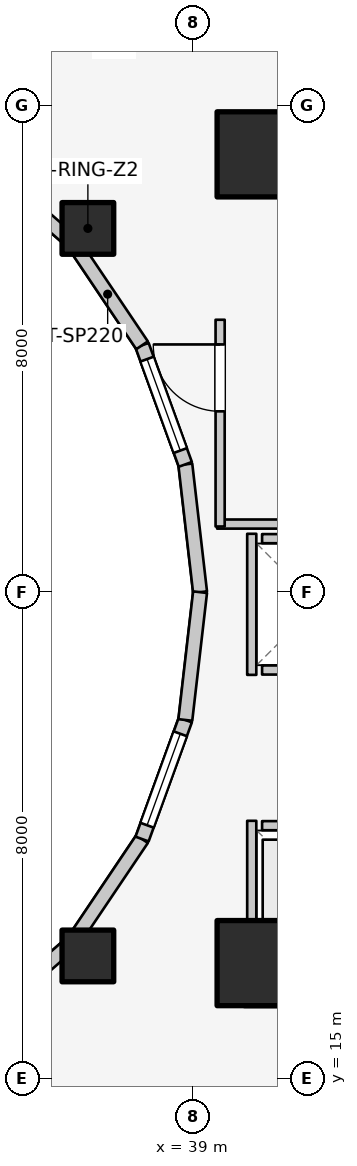
"""IFC4 building model, lengths in metres.
Left out: names, types, materials, properties, quantities, classifications, styles, units other than length and angle.
Written with IfcOpenShell. Run it as: python <this file> out.ifc"""

import sys

from ifc_helpers import new_model, si_unit, direction, frame, frame_2d, origin, origin_2d, place, context, subcontext, project, spatial, rectangle, extrude, element, fill, save


model = new_model("IFC4")
c1 = context("Model", 3, precision=1e-05, world=origin(), true_north=direction((0.0, 1.0)))
c2 = subcontext(c1, "Body", "Model", "MODEL_VIEW")
j1 = project(units=[si_unit("LENGTHUNIT", "METRE"), si_unit("PLANEANGLEUNIT", "RADIAN")], contexts=[c1])
p1 = place(None, origin())
s1 = spatial("IfcSite", under=j1, at=p1, CompositionType="ELEMENT")
p2 = place(p1, origin())
s2 = spatial("IfcBuilding", under=s1, at=p2, CompositionType="ELEMENT")
p3 = place(p2, frame((0.0, 0.0, 94.9)))
s3 = spatial("IfcBuildingStorey", under=s2, at=p3, CompositionType="ELEMENT", Elevation=94.9)
for number, where, z_axis, x_axis in (
    (1, (39.85, 16.55, 0.0), (0.0, 0.0, 1.0), (1.0, 0.0, 0.0)),
    (2, (39.85, 30.35, 0.0), (0.0, 0.0, 1.0), (1.0, 0.0, 0.0)),
):
    element("IfcWall", number, at=place(p3, frame(where, z_axis=z_axis, x_axis=x_axis)), inside=s3, PredefinedType="SHEAR", context=c2, shape_type="SweptSolid", body=[
        extrude(rectangle(XDim=4.5, YDim=0.7, at=frame_2d((2.25, 0.0))), origin(), (0.0, 0.0, 1.0), 3.1),
    ])
for number, where, z_axis, x_axis in (
    (3, (40.1, 16.9, 0.0), (0.0, 0.0, 1.0), (1.0, 0.0, 0.0)),
    (4, (40.1, 30.2, 0.0), (0.0, 0.0, 1.0), (1.0, 0.0, 0.0)),
):
    element("IfcColumn", number, at=place(p3, frame(where, z_axis=z_axis, x_axis=x_axis)), inside=s3, PredefinedType="COLUMN", context=c2, shape_type="SweptSolid", body=[
        extrude(rectangle(XDim=1.4, YDim=1.4, at=origin_2d()), origin(), (0.0, 0.0, 1.0), 3.1),
    ])
for number, where, z_axis, x_axis in (
    (5, (37.275, 28.982, 0.0), (0.0, 0.0, 1.0), (1.0, 0.0, 0.0)),
    (6, (37.275, 17.018, 0.0), (0.0, 0.0, 1.0), (1.0, 0.0, 0.0)),
):
    element("IfcColumn", number, at=place(p3, frame(where, z_axis=z_axis, x_axis=x_axis)), inside=s3, PredefinedType="COLUMN", context=c2, shape_type="SweptSolid", body=[
        extrude(rectangle(XDim=0.85, YDim=0.85, at=origin_2d()), origin(), (0.0, 0.0, 1.0), 3.1),
    ])
p4 = place(p3, frame((39.12, 23.0, 0.0), z_axis=(0.0, 0.0, 1.0), x_axis=(-0.114711713601, 0.993398823617, 0.0)))
e7 = element("IfcWall", 7, at=p4, inside=s3, PredefinedType="STANDARD", context=c2, shape_type="SweptSolid", body=[
    extrude(rectangle(XDim=2.115, YDim=0.23, at=frame_2d((1.058, 0.0))), origin(), (0.0, 0.0, 1.0), 2.84),
])
p5 = place(p3, frame((38.877, 25.102, 0.0), z_axis=(0.0, 0.0, 1.0), x_axis=(-0.341423187295, 0.93990968033, 0.0)))
e8 = element("IfcWall", 8, at=p5, inside=s3, PredefinedType="STANDARD", context=c2, shape_type="SweptSolid", body=[
    extrude(rectangle(XDim=2.084, YDim=0.23, at=frame_2d((1.042, 0.0))), origin(), (0.0, 0.0, 1.0), 2.84),
])
p6 = place(p5, frame((0.242, 0.0, 0.85)))
e9 = element("IfcOpeningElement", 9, at=p6, cuts=e8, PredefinedType="OPENING", context=c2, shape_type="SweptSolid", body=[
    extrude(rectangle(XDim=1.6, YDim=1.65, at=frame_2d((0.8, 0.825))), frame((0.0, 0.125, 0.0), z_axis=(0.0, -1.0, 0.0), x_axis=(1.0, 0.0, 0.0)), (0.0, 0.0, 1.0), 0.25),
])
p7 = place(p3, frame((38.166, 27.06, 0.0), z_axis=(0.0, 0.0, 1.0), x_axis=(-0.558197800898, 0.829707909492, 0.0)))
e10 = element("IfcWall", 10, at=p7, inside=s3, PredefinedType="STANDARD", context=c2, shape_type="SweptSolid", body=[
    extrude(rectangle(XDim=2.027, YDim=0.23, at=frame_2d((1.013, 0.0))), origin(), (0.0, 0.0, 1.0), 2.16),
])
for number, where, z_axis, x_axis in (
    (11, (37.035, 28.742, 0.0), (0.0, 0.0, 1.0), (-0.753, 0.659, 0.0)),
    (12, (35.56, 15.968, 0.0), (0.0, 0.0, 1.0), (0.753, 0.659, 0.0)),
):
    element("IfcWall", number, at=place(p3, frame(where, z_axis=z_axis, x_axis=x_axis)), inside=s3, PredefinedType="STANDARD", context=c2, shape_type="SweptSolid", body=[
        extrude(rectangle(XDim=1.959, YDim=0.23, at=frame_2d((0.98, 0.0))), origin(), (0.0, 0.0, 1.0), 2.16),
    ])
p8 = place(p3, frame((37.035, 17.258, 0.0), z_axis=(0.0, 0.0, 1.0), x_axis=(0.558197800898, 0.829707909492, 0.0)))
e13 = element("IfcWall", 13, at=p8, inside=s3, PredefinedType="STANDARD", context=c2, shape_type="SweptSolid", body=[
    extrude(rectangle(XDim=2.027, YDim=0.23, at=frame_2d((1.013, 0.0))), origin(), (0.0, 0.0, 1.0), 2.16),
])
p9 = place(p3, frame((38.166, 18.94, 0.0), z_axis=(0.0, 0.0, 1.0), x_axis=(0.341423187295, 0.93990968033, 0.0)))
e14 = element("IfcWall", 14, at=p9, inside=s3, PredefinedType="STANDARD", context=c2, shape_type="SweptSolid", body=[
    extrude(rectangle(XDim=2.084, YDim=0.23, at=frame_2d((1.042, 0.0))), origin(), (0.0, 0.0, 1.0), 2.84),
])
p10 = place(p9, frame((0.242, 0.0, 0.85)))
e15 = element("IfcOpeningElement", 15, at=p10, cuts=e14, PredefinedType="OPENING", context=c2, shape_type="SweptSolid", body=[
    extrude(rectangle(XDim=1.6, YDim=1.65, at=frame_2d((0.8, 0.825))), frame((0.0, 0.125, 0.0), z_axis=(0.0, -1.0, 0.0), x_axis=(1.0, 0.0, 0.0)), (0.0, 0.0, 1.0), 0.25),
])
p11 = place(p3, frame((38.877, 20.898, 0.0), z_axis=(0.0, 0.0, 1.0), x_axis=(0.114711713601, 0.993398823617, 0.0)))
e16 = element("IfcWall", 16, at=p11, inside=s3, PredefinedType="STANDARD", context=c2, shape_type="SweptSolid", body=[
    extrude(rectangle(XDim=2.115, YDim=0.23, at=frame_2d((1.058, 0.0))), origin(), (0.0, 0.0, 1.0), 2.84),
])
p12 = place(p3, frame((40.14, 19.16, 0.0), z_axis=(0.0, 0.0, 1.0), x_axis=(1.0, 0.0, 0.0)))
e17 = element("IfcWall", 17, at=p12, inside=s3, PredefinedType="SOLIDWALL", context=c2, shape_type="SweptSolid", body=[
    extrude(rectangle(XDim=1.82, YDim=0.15, at=frame_2d((0.91, 0.0))), origin(), (0.0, 0.0, 1.0), 2.12),
])
p13 = place(p12, frame((0.36, 0.0, 0.0)))
e18 = element("IfcOpeningElement", 18, at=p13, cuts=e17, PredefinedType="OPENING", context=c2, shape_type="SweptSolid", body=[
    extrude(rectangle(XDim=1.1, YDim=2.1, at=frame_2d((0.55, 1.05))), frame((0.0, 0.085, 0.0), z_axis=(0.0, -1.0, 0.0), x_axis=(1.0, 0.0, 0.0)), (0.0, 0.0, 1.0), 0.17),
])
p14 = place(p3, frame((40.14, 17.1, 0.0), z_axis=(0.0, 0.0, 1.0), x_axis=(1.0, 0.0, 0.0)))
e19 = element("IfcWall", 19, at=p14, inside=s3, PredefinedType="SOLIDWALL", context=c2, shape_type="SweptSolid", body=[
    extrude(rectangle(XDim=1.82, YDim=0.15, at=frame_2d((0.91, 0.0))), origin(), (0.0, 0.0, 1.0), 2.12),
])
p15 = place(p3, frame((39.97, 17.02, 0.0), z_axis=(0.0, 0.0, 1.0), x_axis=(0.0, 1.0, 0.0)))
e20 = element("IfcWall", 20, at=p15, inside=s3, PredefinedType="SOLIDWALL", context=c2, shape_type="SweptSolid", body=[
    extrude(rectangle(XDim=2.22, YDim=0.15, at=frame_2d((1.11, 0.0))), origin(), (0.0, 0.0, 1.0), 2.12),
])
for number, where, z_axis, x_axis in (
    (21, (40.14, 21.72, 0.0), (0.0, 0.0, 1.0), (1.0, 0.0, 0.0)),
    (22, (40.14, 23.88, 0.0), (0.0, 0.0, 1.0), (1.0, 0.0, 0.0)),
):
    element("IfcWall", number, at=place(p3, frame(where, z_axis=z_axis, x_axis=x_axis)), inside=s3, PredefinedType="SOLIDWALL", context=c2, shape_type="SweptSolid", body=[
        extrude(rectangle(XDim=1.82, YDim=0.15, at=frame_2d((0.91, 0.0))), origin(), (0.0, 0.0, 1.0), 2.12),
    ])
p16 = place(p3, frame((39.97, 21.64, 0.0), z_axis=(0.0, 0.0, 1.0), x_axis=(0.0, 1.0, 0.0)))
e23 = element("IfcWall", 23, at=p16, inside=s3, PredefinedType="SOLIDWALL", context=c2, shape_type="SweptSolid", body=[
    extrude(rectangle(XDim=2.32, YDim=0.15, at=frame_2d((1.16, 0.0))), origin(), (0.0, 0.0, 1.0), 2.12),
])
p17 = place(p3, frame((39.4, 24.12, 0.0), z_axis=(0.0, 0.0, 1.0), x_axis=(1.0, 0.0, 0.0)))
e24 = element("IfcWall", 24, at=p17, inside=s3, PredefinedType="PARTITIONING", context=c2, shape_type="SweptSolid", body=[
    extrude(rectangle(XDim=5.08, YDim=0.15, at=frame_2d((2.54, 0.0))), origin(), (0.0, 0.0, 1.0), 2.12),
])
p18 = place(p3, frame((39.45, 24.08, 0.0), z_axis=(0.0, 0.0, 1.0), x_axis=(0.0, 1.0, 0.0)))
e25 = element("IfcWall", 25, at=p18, inside=s3, PredefinedType="PARTITIONING", context=c2, shape_type="SweptSolid", body=[
    extrude(rectangle(XDim=3.4, YDim=0.15, at=frame_2d((1.7, 0.0))), origin(), (0.0, 0.0, 1.0), 2.855),
])
p19 = place(p18, frame((1.894, 0.0, 0.0)))
e26 = element("IfcOpeningElement", 26, at=p19, cuts=e25, PredefinedType="OPENING", context=c2, shape_type="SweptSolid", body=[
    extrude(rectangle(XDim=1.1, YDim=2.1, at=frame_2d((0.55, 1.05))), frame((0.0, 0.085, 0.0), z_axis=(0.0, -1.0, 0.0), x_axis=(1.0, 0.0, 0.0)), (0.0, 0.0, 1.0), 0.17),
])
p20 = place(p6, origin())
e27 = element("IfcWindow", 27, at=p20, inside=s3, PartitioningType="SINGLE_PANEL", PredefinedType="WINDOW", context=c2, shape_type="SweptSolid", body=[
    extrude(rectangle(XDim=1.6, YDim=1.65, at=frame_2d((0.8, 0.825))), frame((0.0, 0.03, 0.0), z_axis=(0.0, -1.0, 0.0), x_axis=(1.0, 0.0, 0.0)), (0.0, 0.0, 1.0), 0.06),
])
fill(e9, e27)
p21 = place(p10, origin())
e28 = element("IfcWindow", 28, at=p21, inside=s3, PartitioningType="SINGLE_PANEL", PredefinedType="WINDOW", context=c2, shape_type="SweptSolid", body=[
    extrude(rectangle(XDim=1.6, YDim=1.65, at=frame_2d((0.8, 0.825))), frame((0.0, 0.03, 0.0), z_axis=(0.0, -1.0, 0.0), x_axis=(1.0, 0.0, 0.0)), (0.0, 0.0, 1.0), 0.06),
])
fill(e15, e28)
p22 = place(p19, origin())
e29 = element("IfcDoor", 29, at=p22, inside=s3, OperationType="SINGLE_SWING_RIGHT", PredefinedType="DOOR", context=c2, shape_type="SweptSolid", body=[
    extrude(rectangle(XDim=1.1, YDim=2.1, at=frame_2d((0.55, 1.05))), frame((0.0, 0.025, 0.0), z_axis=(0.0, -1.0, 0.0), x_axis=(1.0, 0.0, 0.0)), (0.0, 0.0, 1.0), 0.05),
])
fill(e26, e29)
save(model, sys.argv[1])
